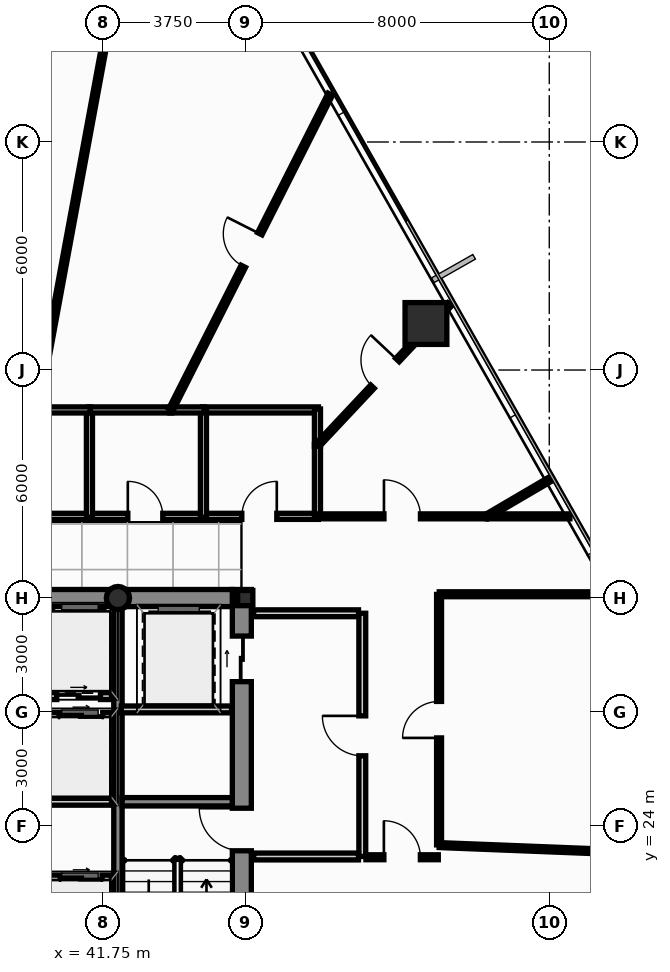
"""IFC4 building model, lengths in metres.
Left out: names, types, materials, properties, quantities, classifications, styles, units other than length and angle.
Written with IfcOpenShell. Run it as: python <this file> out.ifc"""

import sys

from ifc_helpers import new_model, si_unit, direction, frame, frame_2d, origin, origin_2d, place, context, subcontext, project, spatial, rectangle, hollow_rectangle, hollow_circle, i_section, extrude, source, transform, mapped, element, fill, save


model = new_model("IFC4")
c1 = context("Model", 3, precision=1e-05, world=origin(), true_north=direction((0.0, 1.0)))
c2 = subcontext(c1, "Body", "Model", "MODEL_VIEW")
j1 = project(units=[si_unit("LENGTHUNIT", "METRE"), si_unit("PLANEANGLEUNIT", "RADIAN")], contexts=[c1])
p1 = place(None, origin())
s1 = spatial("IfcSite", under=j1, at=p1, CompositionType="ELEMENT")
p2 = place(p1, origin())
s2 = spatial("IfcBuilding", under=s1, at=p2, CompositionType="ELEMENT")
p3 = place(p2, frame((0.0, 0.0, 127.3)))
s3 = spatial("IfcBuildingStorey", under=s2, at=p3, CompositionType="ELEMENT", Elevation=127.3)
m1 = source(origin(), c2, "Body", "SweptSolid", [
    extrude(i_section(OverallWidth=0.4, OverallDepth=0.4, WebThickness=0.02, FlangeThickness=0.032, at=origin_2d()), origin(), (0.0, 0.0, 1.0), 4.5),
])
p4 = place(p3, frame((45.5, 30.0, 0.0), z_axis=(0.0, 0.0, 1.0), x_axis=(1.0, 0.0, 0.0)))
e1 = element("IfcColumn", 1, at=p4, inside=s3, PredefinedType="COLUMN", context=c2, shape_type="MappedRepresentation", body=[
    mapped(m1, transform((0.0, 0.0, 0.0), scale=1.0)),
])
m2 = source(origin(), c2, "Body", "SweptSolid", [
    extrude(hollow_circle(Radius=0.305, WallThickness=0.025, at=origin_2d()), origin(), (0.0, 0.0, 1.0), 4.5),
])
p5 = place(p3, frame((42.15, 30.0, 0.0), z_axis=(0.0, 0.0, 1.0), x_axis=(1.0, 0.0, 0.0)))
e2 = element("IfcColumn", 2, at=p5, inside=s3, PredefinedType="COLUMN", context=c2, shape_type="MappedRepresentation", body=[
    mapped(m2, transform((0.0, 0.0, 0.0), scale=1.0)),
])
p6 = place(p3, frame((45.41, 16.95, 0.0), z_axis=(0.0, 0.0, 1.0), x_axis=(0.0, 1.0, 0.0)))
e3 = element("IfcWall", 3, at=p6, inside=s3, PredefinedType="SHEAR", context=c2, shape_type="SweptSolid", body=[
    extrude(rectangle(XDim=13.275, YDim=0.5, at=frame_2d((6.638, 0.0))), origin(), (0.0, 0.0, 1.0), 4.5),
])
p7 = place(p6, frame((6.4, 0.0, 0.0)))
e4 = element("IfcOpeningElement", 4, at=p7, cuts=e3, PredefinedType="OPENING", context=c2, shape_type="SweptSolid", body=[
    extrude(rectangle(XDim=1.12, YDim=2.15, at=frame_2d((0.56, 1.075))), frame((0.0, 0.262, 0.0), z_axis=(0.0, -1.0, 0.0), x_axis=(1.0, 0.0, 0.0)), (0.0, 0.0, 1.0), 0.524),
])
p8 = place(p6, frame((10.85, 0.0, 0.0)))
e5 = element("IfcOpeningElement", 5, at=p8, cuts=e3, PredefinedType="OPENING", context=c2, shape_type="SweptSolid", body=[
    extrude(rectangle(XDim=1.2, YDim=2.2, at=frame_2d((0.6, 1.1))), frame((0.0, 0.262, 0.0), z_axis=(0.0, -1.0, 0.0), x_axis=(1.0, 0.0, 0.0)), (0.0, 0.0, 1.0), 0.524),
])
p9 = place(p3, frame((40.16, 30.0, 0.0), z_axis=(0.0, 0.0, 1.0), x_axis=(1.0, 0.0, 0.0)))
e6 = element("IfcWall", 6, at=p9, inside=s3, PredefinedType="SHEAR", context=c2, shape_type="SweptSolid", body=[
    extrude(rectangle(XDim=1.88, YDim=0.45, at=frame_2d((0.94, 0.0))), origin(), (0.0, 0.0, 1.0), 4.5),
])
p10 = place(p3, frame((42.26, 30.0, 0.0), z_axis=(0.0, 0.0, 1.0), x_axis=(1.0, 0.0, 0.0)))
e7 = element("IfcWall", 7, at=p10, inside=s3, PredefinedType="SHEAR", context=c2, shape_type="SweptSolid", body=[
    extrude(rectangle(XDim=2.9, YDim=0.45, at=frame_2d((1.45, 0.0))), origin(), (0.0, 0.0, 1.0), 4.5),
])
p11 = place(p3, frame((42.15, 16.95, 0.0), z_axis=(0.0, 0.0, 1.0), x_axis=(0.0, 1.0, 0.0)))
e8 = element("IfcWall", 8, at=p11, inside=s3, PredefinedType="SHEAR", context=c2, shape_type="SweptSolid", body=[
    extrude(rectangle(XDim=13.275, YDim=0.22, at=frame_2d((6.638, 0.0))), origin(), (0.0, 0.0, 1.0), 4.5),
])
p12 = place(p3, frame((42.26, 24.64, 0.0), z_axis=(0.0, 0.0, 1.0), x_axis=(1.0, 0.0, 0.0)))
e9 = element("IfcWall", 9, at=p12, inside=s3, PredefinedType="SHEAR", context=c2, shape_type="SweptSolid", body=[
    extrude(rectangle(XDim=2.9, YDim=0.22, at=frame_2d((1.45, 0.0))), origin(), (0.0, 0.0, 1.0), 4.5),
])
m3 = source(origin(), c2, "Body", "SweptSolid", [
    extrude(hollow_rectangle(XDim=1.1, YDim=1.1, WallThickness=0.06, at=origin_2d()), origin(), (0.0, 0.0, 1.0), 4.501),
])
p13 = place(p3, frame((50.255, 37.224, 0.0), z_axis=(-0.019364512966, -0.005966656656, 0.999794686246), x_axis=(0.294462042916, -0.955663175644, 0.0)))
e10 = element("IfcColumn", 10, at=p13, inside=s3, PredefinedType="COLUMN", context=c2, shape_type="MappedRepresentation", body=[
    mapped(m3, transform((0.0, 0.0, 0.0), scale=1.0)),
])
p14 = place(p3, frame((40.28, 22.62, 0.0), z_axis=(0.0, 0.0, 1.0), x_axis=(1.0, 0.0, 0.0)))
e11 = element("IfcWall", 11, at=p14, inside=s3, PredefinedType="PARTITIONING", context=c2, shape_type="SweptSolid", body=[
    extrude(rectangle(XDim=1.7, YDim=0.18, at=frame_2d((0.85, 0.0))), origin(), (0.0, 0.0, 1.0), 4.25),
])
p15 = place(p14, frame((0.35, 0.0, 0.0)))
e12 = element("IfcOpeningElement", 12, at=p15, cuts=e11, PredefinedType="OPENING", context=c2, shape_type="SweptSolid", body=[
    extrude(rectangle(XDim=1.1, YDim=2.2, at=frame_2d((0.55, 1.1))), frame((0.0, 0.102, 0.0), z_axis=(0.0, -1.0, 0.0), x_axis=(1.0, 0.0, 0.0)), (0.0, 0.0, 1.0), 0.204),
])
p16 = place(p3, frame((40.28, 26.9, 0.0), z_axis=(0.0, 0.0, 1.0), x_axis=(1.0, 0.0, 0.0)))
e13 = element("IfcWall", 13, at=p16, inside=s3, PredefinedType="PARTITIONING", context=c2, shape_type="SweptSolid", body=[
    extrude(rectangle(XDim=1.7, YDim=0.18, at=frame_2d((0.85, 0.0))), origin(), (0.0, 0.0, 1.0), 4.25),
])
p17 = place(p16, frame((0.32, 0.0, 0.0)))
e14 = element("IfcOpeningElement", 14, at=p17, cuts=e13, PredefinedType="OPENING", context=c2, shape_type="SweptSolid", body=[
    extrude(rectangle(XDim=1.15, YDim=2.2, at=frame_2d((0.575, 1.1))), frame((0.0, 0.102, 0.0), z_axis=(0.0, -1.0, 0.0), x_axis=(1.0, 0.0, 0.0)), (0.0, 0.0, 1.0), 0.204),
])
p18 = place(p3, frame((40.2, 24.64, 0.0), z_axis=(0.0, 0.0, 1.0), x_axis=(1.0, 0.0, 0.0)))
e15 = element("IfcWall", 15, at=p18, inside=s3, PredefinedType="PARTITIONING", context=c2, shape_type="SweptSolid", body=[
    extrude(rectangle(XDim=1.78, YDim=0.18, at=frame_2d((0.89, 0.0))), origin(), (0.0, 0.0, 1.0), 4.25),
])
p19 = place(p3, frame((40.22, 27.42, 0.0), z_axis=(0.0, 0.0, 1.0), x_axis=(1.0, 0.0, 0.0)))
e16 = element("IfcWall", 16, at=p19, inside=s3, PredefinedType="PARTITIONING", context=c2, shape_type="SweptSolid", body=[
    extrude(rectangle(XDim=1.76, YDim=0.18, at=frame_2d((0.88, 0.0))), origin(), (0.0, 0.0, 1.0), 4.25),
])
p20 = place(p19, frame((0.32, 0.0, 0.0)))
e17 = element("IfcOpeningElement", 17, at=p20, cuts=e16, PredefinedType="OPENING", context=c2, shape_type="SweptSolid", body=[
    extrude(rectangle(XDim=1.15, YDim=2.2, at=frame_2d((0.575, 1.1))), frame((0.0, 0.102, 0.0), z_axis=(0.0, -1.0, 0.0), x_axis=(1.0, 0.0, 0.0)), (0.0, 0.0, 1.0), 0.204),
])
p21 = place(p3, frame((48.58, 23.2, 0.0), z_axis=(0.0, 0.0, 1.0), x_axis=(0.0, 1.0, 0.0)))
e18 = element("IfcWall", 18, at=p21, inside=s3, PredefinedType="PARTITIONING", context=c2, shape_type="SweptSolid", body=[
    extrude(rectangle(XDim=6.4, YDim=0.18, at=frame_2d((3.2, 0.0))), origin(), (0.0, 0.0, 1.0), 3.928),
])
p22 = place(p21, frame((2.65, 0.0, 0.0)))
e19 = element("IfcOpeningElement", 19, at=p22, cuts=e18, PredefinedType="OPENING", context=c2, shape_type="SweptSolid", body=[
    extrude(rectangle(XDim=1.05, YDim=2.15, at=frame_2d((0.525, 1.075))), frame((0.0, 0.102, 0.0), z_axis=(0.0, -1.0, 0.0), x_axis=(1.0, 0.0, 0.0)), (0.0, 0.0, 1.0), 0.204),
])
p23 = place(p3, frame((45.72, 23.2, 0.0), z_axis=(0.0, 0.0, 1.0), x_axis=(1.0, 0.0, 0.0)))
e20 = element("IfcWall", 20, at=p23, inside=s3, PredefinedType="PARTITIONING", context=c2, shape_type="SweptSolid", body=[
    extrude(rectangle(XDim=2.76, YDim=0.18, at=frame_2d((1.38, 0.0))), origin(), (0.0, 0.0, 1.0), 4.25),
])
p24 = place(p3, frame((45.72, 29.6, 0.0), z_axis=(0.0, 0.0, 1.0), x_axis=(1.0, 0.0, 0.0)))
e21 = element("IfcWall", 21, at=p24, inside=s3, PredefinedType="PARTITIONING", context=c2, shape_type="SweptSolid", body=[
    extrude(rectangle(XDim=2.76, YDim=0.18, at=frame_2d((1.38, 0.0))), origin(), (0.0, 0.0, 1.0), 3.775),
])
p25 = place(p3, frame((42.24, 27.07, 0.0), z_axis=(0.0, 0.0, 1.0), x_axis=(1.0, 0.0, 0.0)))
e22 = element("IfcWall", 22, at=p25, inside=s3, PredefinedType="PARTITIONING", context=c2, shape_type="SweptSolid", body=[
    extrude(rectangle(XDim=2.9, YDim=0.18, at=frame_2d((1.45, 0.0))), origin(), (0.0, 0.0, 1.0), 4.25),
])
p26 = place(p3, frame((38.375, 32.15, 0.0), z_axis=(0.0, 0.0, 1.0), x_axis=(1.0, 0.0, 0.0)))
e23 = element("IfcWall", 23, at=p26, inside=s3, PredefinedType="PLUMBINGWALL", context=c2, shape_type="SweptSolid", body=[
    extrude(rectangle(XDim=3.05, YDim=0.16, at=frame_2d((1.525, 0.0))), origin(), (0.0, 0.0, 1.0), 3.928),
])
p27 = place(p26, frame((1.035, 0.0, 0.0)))
e24 = element("IfcOpeningElement", 24, at=p27, cuts=e23, PredefinedType="OPENING", context=c2, shape_type="SweptSolid", body=[
    extrude(rectangle(XDim=0.92, YDim=2.1, at=frame_2d((0.46, 1.05))), frame((0.0, 0.092, 0.0), z_axis=(0.0, -1.0, 0.0), x_axis=(1.0, 0.0, 0.0)), (0.0, 0.0, 1.0), 0.184),
])
p28 = place(p3, frame((41.375, 32.15, 0.0), z_axis=(0.0, 0.0, 1.0), x_axis=(1.0, 0.0, 0.0)))
e25 = element("IfcWall", 25, at=p28, inside=s3, PredefinedType="PLUMBINGWALL", context=c2, shape_type="SweptSolid", body=[
    extrude(rectangle(XDim=3.05, YDim=0.16, at=frame_2d((1.525, 0.0))), origin(), (0.0, 0.0, 1.0), 3.928),
])
p29 = place(p28, frame((1.035, 0.0, 0.0)))
e26 = element("IfcOpeningElement", 26, at=p29, cuts=e25, PredefinedType="OPENING", context=c2, shape_type="SweptSolid", body=[
    extrude(rectangle(XDim=0.92, YDim=2.1, at=frame_2d((0.46, 1.05))), frame((0.0, 0.092, 0.0), z_axis=(0.0, -1.0, 0.0), x_axis=(1.0, 0.0, 0.0)), (0.0, 0.0, 1.0), 0.184),
])
p30 = place(p3, frame((44.375, 32.15, 0.0), z_axis=(0.0, 0.0, 1.0), x_axis=(1.0, 0.0, 0.0)))
e27 = element("IfcWall", 27, at=p30, inside=s3, PredefinedType="PLUMBINGWALL", context=c2, shape_type="SweptSolid", body=[
    extrude(rectangle(XDim=3.05, YDim=0.16, at=frame_2d((1.525, 0.0))), origin(), (0.0, 0.0, 1.0), 3.928),
])
p31 = place(p30, frame((1.035, 0.0, 0.0)))
e28 = element("IfcOpeningElement", 28, at=p31, cuts=e27, PredefinedType="OPENING", context=c2, shape_type="SweptSolid", body=[
    extrude(rectangle(XDim=0.92, YDim=2.1, at=frame_2d((0.46, 1.05))), frame((0.0, 0.092, 0.0), z_axis=(0.0, -1.0, 0.0), x_axis=(1.0, 0.0, 0.0)), (0.0, 0.0, 1.0), 0.184),
])
p32 = place(p3, frame((47.425, 34.95, 0.0), z_axis=(0.0, 0.0, 1.0), x_axis=(-1.0, 0.0, 0.0)))
e29 = element("IfcWall", 29, at=p32, inside=s3, PredefinedType="PLUMBINGWALL", context=c2, shape_type="SweptSolid", body=[
    extrude(rectangle(XDim=3.05, YDim=0.16, at=frame_2d((1.525, 0.0))), origin(), (0.0, 0.0, 1.0), 3.928),
])
for number, where, z_axis, x_axis in (
    (30, (41.4, 32.125, 0.0), (0.0, 0.0, 1.0), (0.0, 1.0, 0.0)),
    (31, (44.4, 32.125, 0.0), (0.0, 0.0, 1.0), (0.0, 1.0, 0.0)),
):
    element("IfcWall", number, at=place(p3, frame(where, z_axis=z_axis, x_axis=x_axis)), inside=s3, PredefinedType="PLUMBINGWALL", context=c2, shape_type="SweptSolid", body=[
        extrude(rectangle(XDim=2.85, YDim=0.16, at=frame_2d((1.425, 0.0))), origin(), (0.0, 0.0, 1.0), 4.25),
    ])
p33 = place(p3, frame((41.375, 34.95, 0.0), z_axis=(0.0, 0.0, 1.0), x_axis=(1.0, 0.0, 0.0)))
e32 = element("IfcWall", 32, at=p33, inside=s3, PredefinedType="PLUMBINGWALL", context=c2, shape_type="SweptSolid", body=[
    extrude(rectangle(XDim=2.19, YDim=0.16, at=frame_2d((1.095, 0.0))), origin(), (0.0, 0.0, 1.0), 3.928),
])
p34 = place(p3, frame((47.4, 32.125, 0.0), z_axis=(0.0, 0.0, 1.0), x_axis=(0.0, 1.0, 0.0)))
e33 = element("IfcWall", 33, at=p34, inside=s3, PredefinedType="PLUMBINGWALL", context=c2, shape_type="SweptSolid", body=[
    extrude(rectangle(XDim=1.92, YDim=0.16, at=frame_2d((0.96, 0.0))), origin(), (0.0, 0.0, 1.0), 4.25),
])
p35 = place(p3, frame((39.995, 34.95, 0.0), z_axis=(0.0, 0.0, 1.0), x_axis=(1.0, 0.0, 0.0)))
e34 = element("IfcWall", 34, at=p35, inside=s3, PredefinedType="PLUMBINGWALL", context=c2, shape_type="SweptSolid", body=[
    extrude(rectangle(XDim=1.43, YDim=0.16, at=frame_2d((0.715, 0.0))), origin(), (0.0, 0.0, 1.0), 3.928),
])
p36 = place(p3, frame((47.4, 33.995, 0.0), z_axis=(0.0, 0.0, 1.0), x_axis=(0.0, 1.0, 0.0)))
e35 = element("IfcWall", 35, at=p36, inside=s3, PredefinedType="PLUMBINGWALL", context=c2, shape_type="SweptSolid", body=[
    extrude(rectangle(XDim=0.98, YDim=0.16, at=frame_2d((0.49, 0.0))), origin(), (0.0, 0.0, 1.0), 4.25),
])
p37 = place(p3, frame((43.515, 34.95, 0.0), z_axis=(0.0, 0.0, 1.0), x_axis=(1.0, 0.0, 0.0)))
e36 = element("IfcWall", 36, at=p37, inside=s3, PredefinedType="PLUMBINGWALL", context=c2, shape_type="SweptSolid", body=[
    extrude(rectangle(XDim=0.91, YDim=0.16, at=frame_2d((0.455, 0.0))), origin(), (0.0, 0.0, 1.0), 3.928),
])
p38 = place(p3, frame((40.021, 34.955, 0.0), z_axis=(0.0, 0.0, 1.0), x_axis=(0.181390390279, 0.983411168492, 0.0)))
e37 = element("IfcWall", 37, at=p38, inside=s3, PredefinedType="PARTITIONING", context=c2, shape_type="SweptSolid", body=[
    extrude(rectangle(XDim=16.764, YDim=0.13, at=frame_2d((8.382, 0.0))), origin(), (0.0, 0.0, 1.0), 4.25),
])
p39 = place(p3, frame((43.542, 34.954, 0.0), z_axis=(0.0, 0.0, 1.0), x_axis=(0.451040991856, 0.89250323454, 0.0)))
e38 = element("IfcWall", 38, at=p39, inside=s3, PredefinedType="PARTITIONING", context=c2, shape_type="SweptSolid", body=[
    extrude(rectangle(XDim=9.303, YDim=0.13, at=frame_2d((4.651, 0.0))), origin(), (0.0, 0.0, 1.0), 4.25),
])
p40 = place(p39, frame((4.229, 0.0, 0.0)))
e39 = element("IfcOpeningElement", 39, at=p40, cuts=e38, PredefinedType="OPENING", context=c2, shape_type="SweptSolid", body=[
    extrude(rectangle(XDim=0.96, YDim=2.15, at=frame_2d((0.48, 1.075))), frame((0.0, 0.077, 0.0), z_axis=(0.0, -1.0, 0.0), x_axis=(1.0, 0.0, 0.0)), (0.0, 0.0, 1.0), 0.154),
])
p41 = place(p3, frame((50.605, 23.5, 0.0), z_axis=(0.0, 0.0, 1.0), x_axis=(0.999229272457, -0.03925380319, 0.0)))
e40 = element("IfcWall", 40, at=p41, inside=s3, PredefinedType="PARTITIONING", context=c2, shape_type="SweptSolid", body=[
    extrude(rectangle(XDim=8.546, YDim=0.13, at=frame_2d((4.273, 0.0))), origin(), (0.0, 0.0, 1.0), 4.25),
])
p42 = place(p3, frame((50.6, 23.505, 0.0), z_axis=(0.0, 0.0, 1.0), x_axis=(0.0, 1.0, 0.0)))
e41 = element("IfcWall", 41, at=p42, inside=s3, PredefinedType="PARTITIONING", context=c2, shape_type="SweptSolid", body=[
    extrude(rectangle(XDim=6.59, YDim=0.13, at=frame_2d((3.295, 0.0))), origin(), (0.0, 0.0, 1.0), 3.928),
])
p43 = place(p42, frame((2.815, 0.0, 0.0)))
e42 = element("IfcOpeningElement", 42, at=p43, cuts=e41, PredefinedType="OPENING", context=c2, shape_type="SweptSolid", body=[
    extrude(rectangle(XDim=0.96, YDim=2.15, at=frame_2d((0.48, 1.075))), frame((0.0, 0.077, 0.0), z_axis=(0.0, -1.0, 0.0), x_axis=(1.0, 0.0, 0.0)), (0.0, 0.0, 1.0), 0.154),
])
p44 = place(p3, frame((47.403, 34.024, 0.0), z_axis=(0.0, 0.0, 1.0), x_axis=(0.684663849491, 0.728858980325, 0.0)))
e43 = element("IfcWall", 43, at=p44, inside=s3, PredefinedType="PARTITIONING", context=c2, shape_type="SweptSolid", body=[
    extrude(rectangle(XDim=5.077, YDim=0.13, at=frame_2d((2.538, 0.0))), origin(), (0.0, 0.0, 1.0), 3.775),
])
p45 = place(p44, frame((2.11, 0.0, 0.0)))
e44 = element("IfcOpeningElement", 44, at=p45, cuts=e43, PredefinedType="OPENING", context=c2, shape_type="SweptSolid", body=[
    extrude(rectangle(XDim=0.96, YDim=2.15, at=frame_2d((0.48, 1.075))), frame((0.0, 0.077, 0.0), z_axis=(0.0, -1.0, 0.0), x_axis=(1.0, 0.0, 0.0)), (0.0, 0.0, 1.0), 0.154),
])
p46 = place(p3, frame((50.605, 30.1, 0.0), z_axis=(0.0, 0.0, 1.0), x_axis=(1.0, 0.0, 0.0)))
e45 = element("IfcWall", 45, at=p46, inside=s3, PredefinedType="PARTITIONING", context=c2, shape_type="SweptSolid", body=[
    extrude(rectangle(XDim=4.602, YDim=0.13, at=frame_2d((2.301, 0.0))), origin(), (0.0, 0.0, 1.0), 4.25),
])
p47 = place(p3, frame((47.405, 32.15, 0.0), z_axis=(0.0, 0.0, 1.0), x_axis=(1.0, 0.0, 0.0)))
e46 = element("IfcWall", 46, at=p47, inside=s3, PredefinedType="PARTITIONING", context=c2, shape_type="SweptSolid", body=[
    extrude(rectangle(XDim=4.45, YDim=0.13, at=frame_2d((2.225, 0.0))), origin(), (0.0, 0.0, 1.0), 4.25),
])
p48 = place(p47, frame((1.745, 0.0, 0.0)))
e47 = element("IfcOpeningElement", 47, at=p48, cuts=e46, PredefinedType="OPENING", context=c2, shape_type="SweptSolid", body=[
    extrude(rectangle(XDim=0.96, YDim=2.15, at=frame_2d((0.48, 1.075))), frame((0.0, 0.077, 0.0), z_axis=(0.0, -1.0, 0.0), x_axis=(1.0, 0.0, 0.0)), (0.0, 0.0, 1.0), 0.154),
])
p49 = place(p3, frame((51.865, 32.15, 0.0), z_axis=(0.0, 0.0, 1.0), x_axis=(1.0, 0.0, 0.0)))
e48 = element("IfcWall", 48, at=p49, inside=s3, PredefinedType="PARTITIONING", context=c2, shape_type="SweptSolid", body=[
    extrude(rectangle(XDim=2.178, YDim=0.13, at=frame_2d((1.089, 0.0))), origin(), (0.0, 0.0, 1.0), 4.25),
])
p50 = place(p3, frame((48.675, 23.18, 0.0), z_axis=(0.0, 0.0, 1.0), x_axis=(1.0, 0.0, 0.0)))
e49 = element("IfcWall", 49, at=p50, inside=s3, PredefinedType="PARTITIONING", context=c2, shape_type="SweptSolid", body=[
    extrude(rectangle(XDim=1.905, YDim=0.13, at=frame_2d((0.953, 0.0))), origin(), (0.0, 0.0, 1.0), 4.25),
])
p51 = place(p50, frame((0.473, 0.0, 0.0)))
e50 = element("IfcOpeningElement", 50, at=p51, cuts=e49, PredefinedType="OPENING", context=c2, shape_type="SweptSolid", body=[
    extrude(rectangle(XDim=0.96, YDim=2.15, at=frame_2d((0.48, 1.075))), frame((0.0, 0.077, 0.0), z_axis=(0.0, -1.0, 0.0), x_axis=(1.0, 0.0, 0.0)), (0.0, 0.0, 1.0), 0.154),
])
p52 = place(p3, frame((51.864, 32.153, 0.0), z_axis=(0.0, 0.0, 1.0), x_axis=(0.862457378859, 0.506129696473, 0.0)))
e51 = element("IfcWall", 51, at=p52, inside=s3, PredefinedType="PARTITIONING", context=c2, shape_type="SweptSolid", body=[
    extrude(rectangle(XDim=1.894, YDim=0.13, at=frame_2d((0.947, 0.0))), origin(), (0.0, 0.0, 1.0), 4.25),
])
p53 = place(p7, origin())
e52 = element("IfcDoor", 52, at=p53, inside=s3, OperationType="SINGLE_SWING_RIGHT", PredefinedType="DOOR", context=c2, shape_type="SweptSolid", body=[
    extrude(rectangle(XDim=1.12, YDim=2.15, at=frame_2d((0.56, 1.075))), frame((0.0, 0.025, 0.0), z_axis=(0.0, -1.0, 0.0), x_axis=(1.0, 0.0, 0.0)), (0.0, 0.0, 1.0), 0.05),
])
fill(e4, e52)
p54 = place(p8, origin())
e53 = element("IfcDoor", 53, at=p54, inside=s3, OperationType="SLIDING_TO_RIGHT", PredefinedType="DOOR", context=c2, shape_type="SweptSolid", body=[
    extrude(rectangle(XDim=1.2, YDim=2.2, at=frame_2d((0.6, 1.1))), frame((0.0, 0.025, 0.0), z_axis=(0.0, -1.0, 0.0), x_axis=(1.0, 0.0, 0.0)), (0.0, 0.0, 1.0), 0.05),
])
fill(e5, e53)
p55 = place(p15, origin())
e54 = element("IfcDoor", 54, at=p55, inside=s3, OperationType="SLIDING_TO_LEFT", PredefinedType="DOOR", context=c2, shape_type="SweptSolid", body=[
    extrude(rectangle(XDim=1.1, YDim=2.2, at=frame_2d((0.55, 1.1))), frame((0.0, 0.025, 0.0), z_axis=(0.0, -1.0, 0.0), x_axis=(1.0, 0.0, 0.0)), (0.0, 0.0, 1.0), 0.05),
])
fill(e12, e54)
p56 = place(p17, origin())
e55 = element("IfcDoor", 55, at=p56, inside=s3, OperationType="SLIDING_TO_LEFT", PredefinedType="DOOR", context=c2, shape_type="SweptSolid", body=[
    extrude(rectangle(XDim=1.15, YDim=2.2, at=frame_2d((0.575, 1.1))), frame((0.0, 0.025, 0.0), z_axis=(0.0, -1.0, 0.0), x_axis=(1.0, 0.0, 0.0)), (0.0, 0.0, 1.0), 0.05),
])
fill(e14, e55)
p57 = place(p20, origin())
e56 = element("IfcDoor", 56, at=p57, inside=s3, OperationType="SLIDING_TO_RIGHT", PredefinedType="DOOR", context=c2, shape_type="SweptSolid", body=[
    extrude(rectangle(XDim=1.15, YDim=2.2, at=frame_2d((0.575, 1.1))), frame((0.0, 0.025, 0.0), z_axis=(0.0, -1.0, 0.0), x_axis=(1.0, 0.0, 0.0)), (0.0, 0.0, 1.0), 0.05),
])
fill(e17, e56)
p58 = place(p22, origin())
e57 = element("IfcDoor", 57, at=p58, inside=s3, OperationType="SINGLE_SWING_RIGHT", PredefinedType="DOOR", context=c2, shape_type="SweptSolid", body=[
    extrude(rectangle(XDim=1.05, YDim=2.15, at=frame_2d((0.525, 1.075))), frame((0.0, 0.025, 0.0), z_axis=(0.0, -1.0, 0.0), x_axis=(1.0, 0.0, 0.0)), (0.0, 0.0, 1.0), 0.05),
])
fill(e19, e57)
p59 = place(p29, origin())
e58 = element("IfcDoor", 58, at=p59, inside=s3, OperationType="SINGLE_SWING_LEFT", PredefinedType="DOOR", context=c2, shape_type="SweptSolid", body=[
    extrude(rectangle(XDim=0.92, YDim=2.1, at=frame_2d((0.46, 1.05))), frame((0.0, 0.025, 0.0), z_axis=(0.0, -1.0, 0.0), x_axis=(1.0, 0.0, 0.0)), (0.0, 0.0, 1.0), 0.05),
])
fill(e26, e58)
p60 = place(p31, origin())
e59 = element("IfcDoor", 59, at=p60, inside=s3, OperationType="SINGLE_SWING_RIGHT", PredefinedType="DOOR", context=c2, shape_type="SweptSolid", body=[
    extrude(rectangle(XDim=0.92, YDim=2.1, at=frame_2d((0.46, 1.05))), frame((0.0, 0.025, 0.0), z_axis=(0.0, -1.0, 0.0), x_axis=(1.0, 0.0, 0.0)), (0.0, 0.0, 1.0), 0.05),
])
fill(e28, e59)
p61 = place(p40, origin())
e60 = element("IfcDoor", 60, at=p61, inside=s3, OperationType="SINGLE_SWING_RIGHT", PredefinedType="DOOR", context=c2, shape_type="SweptSolid", body=[
    extrude(rectangle(XDim=0.96, YDim=2.15, at=frame_2d((0.48, 1.075))), frame((0.0, 0.025, 0.0), z_axis=(0.0, -1.0, 0.0), x_axis=(1.0, 0.0, 0.0)), (0.0, 0.0, 1.0), 0.05),
])
fill(e39, e60)
p62 = place(p43, origin())
e61 = element("IfcDoor", 61, at=p62, inside=s3, OperationType="SINGLE_SWING_LEFT", PredefinedType="DOOR", context=c2, shape_type="SweptSolid", body=[
    extrude(rectangle(XDim=0.96, YDim=2.15, at=frame_2d((0.48, 1.075))), frame((0.0, 0.025, 0.0), z_axis=(0.0, -1.0, 0.0), x_axis=(1.0, 0.0, 0.0)), (0.0, 0.0, 1.0), 0.05),
])
fill(e42, e61)
p63 = place(p45, origin())
e62 = element("IfcDoor", 62, at=p63, inside=s3, OperationType="SINGLE_SWING_RIGHT", PredefinedType="DOOR", context=c2, shape_type="SweptSolid", body=[
    extrude(rectangle(XDim=0.96, YDim=2.15, at=frame_2d((0.48, 1.075))), frame((0.0, 0.025, 0.0), z_axis=(0.0, -1.0, 0.0), x_axis=(1.0, 0.0, 0.0)), (0.0, 0.0, 1.0), 0.05),
])
fill(e44, e62)
p64 = place(p48, origin())
e63 = element("IfcDoor", 63, at=p64, inside=s3, OperationType="SINGLE_SWING_LEFT", PredefinedType="DOOR", context=c2, shape_type="SweptSolid", body=[
    extrude(rectangle(XDim=0.96, YDim=2.15, at=frame_2d((0.48, 1.075))), frame((0.0, 0.025, 0.0), z_axis=(0.0, -1.0, 0.0), x_axis=(1.0, 0.0, 0.0)), (0.0, 0.0, 1.0), 0.05),
])
fill(e47, e63)
p65 = place(p51, origin())
e64 = element("IfcDoor", 64, at=p65, inside=s3, OperationType="SINGLE_SWING_LEFT", PredefinedType="DOOR", context=c2, shape_type="SweptSolid", body=[
    extrude(rectangle(XDim=0.96, YDim=2.15, at=frame_2d((0.48, 1.075))), frame((0.0, 0.025, 0.0), z_axis=(0.0, -1.0, 0.0), x_axis=(1.0, 0.0, 0.0)), (0.0, 0.0, 1.0), 0.05),
])
fill(e50, e64)
save(model, sys.argv[1])
